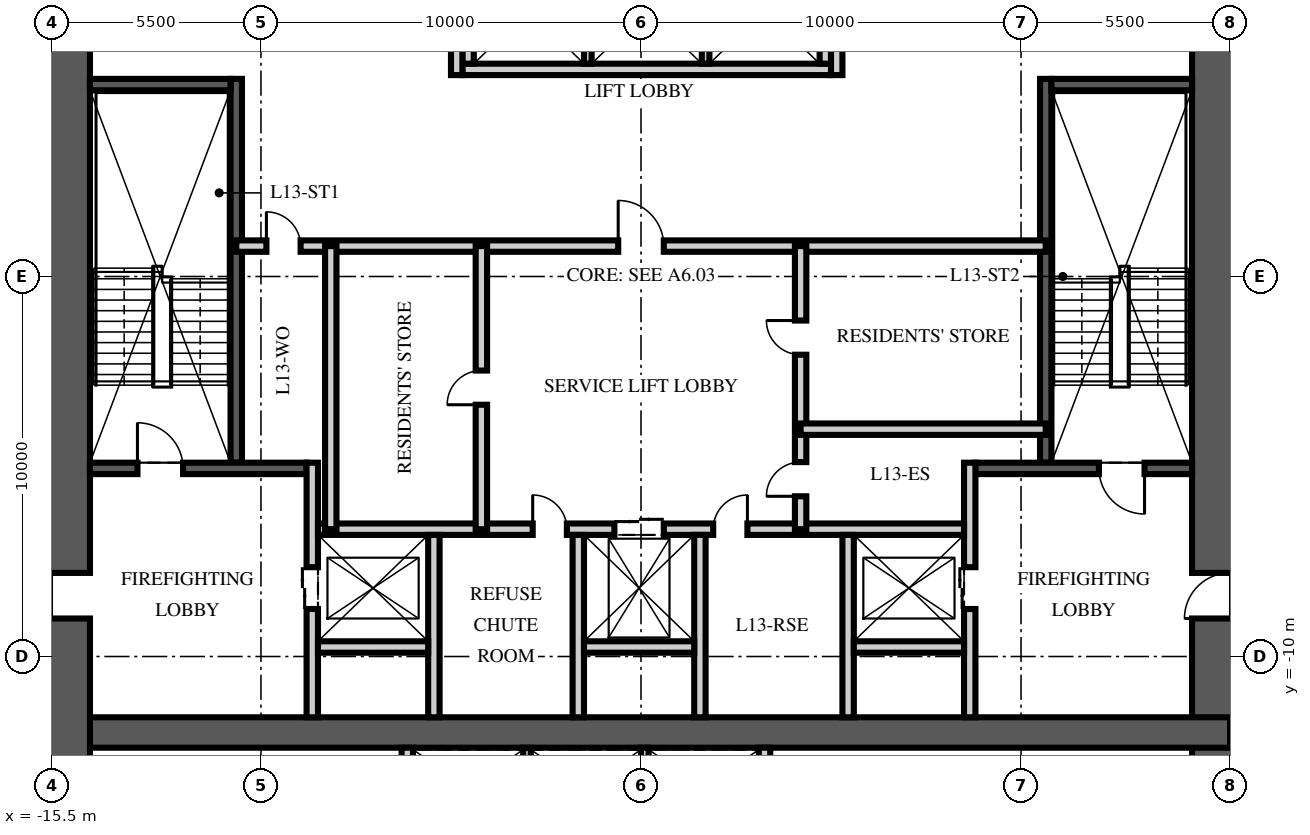
"""IFC4 building model, lengths in metres.
Left out: names, types, materials, properties, quantities, classifications, styles, units other than length and angle.
Written with IfcOpenShell. Run it as: python <this file> out.ifc"""

import sys

from ifc_helpers import new_model, si_unit, direction, frame, frame_2d, origin, place, context, subcontext, project, spatial, rectangle, extrude, element, fill, save


model = new_model("IFC4")
c1 = context("Model", 3, precision=1e-05, world=origin(), true_north=direction((0.0, 1.0)))
c2 = subcontext(c1, "Body", "Model", "MODEL_VIEW")
j1 = project(units=[si_unit("LENGTHUNIT", "METRE"), si_unit("PLANEANGLEUNIT", "RADIAN")], contexts=[c1])
p1 = place(None, origin())
s1 = spatial("IfcSite", under=j1, at=p1, CompositionType="ELEMENT")
p2 = place(p1, origin())
s2 = spatial("IfcBuilding", under=s1, at=p2, CompositionType="ELEMENT")
p3 = place(p2, frame((0.0, 0.0, 54.75)))
s3 = spatial("IfcBuildingStorey", under=s2, at=p3, CompositionType="ELEMENT", Elevation=54.75)
p4 = place(p3, frame((15.5, -15.5, -0.25), z_axis=(0.0, 0.0, 1.0), x_axis=(0.0, 1.0, 0.0)))
e1 = element("IfcWall", 1, at=p4, inside=s3, PredefinedType="SHEAR", context=c2, shape_type="SweptSolid", body=[
    extrude(rectangle(XDim=31.0, YDim=2.0, at=frame_2d((15.5, 0.0))), origin(), (0.0, 0.0, 1.0), 3.75),
])
p5 = place(p4, frame((6.5, 0.0, 0.25)))
e2 = element("IfcOpeningElement", 2, at=p5, cuts=e1, PredefinedType="OPENING", context=c2, shape_type="SweptSolid", body=[
    extrude(rectangle(XDim=1.2, YDim=2.1, at=frame_2d((0.6, 1.05))), frame((0.0, 1.01, 0.0), z_axis=(0.0, -1.0, 0.0), x_axis=(1.0, 0.0, 0.0)), (0.0, 0.0, 1.0), 2.02),
])
p6 = place(p4, frame((23.0, 0.0, 0.25)))
e3 = element("IfcOpeningElement", 3, at=p6, cuts=e1, PredefinedType="OPENING", context=c2, shape_type="SweptSolid", body=[
    extrude(rectangle(XDim=1.8, YDim=2.1, at=frame_2d((0.9, 1.05))), frame((0.0, 1.01, 0.0), z_axis=(0.0, -1.0, 0.0), x_axis=(1.0, 0.0, 0.0)), (0.0, 0.0, 1.0), 2.02),
])
p7 = place(p3, frame((-15.5, -12.0, -0.25), z_axis=(0.0, 0.0, 1.0), x_axis=(1.0, 0.0, 0.0)))
e4 = element("IfcWall", 4, at=p7, inside=s3, PredefinedType="SHEAR", context=c2, shape_type="SweptSolid", body=[
    extrude(rectangle(XDim=31.0, YDim=0.8, at=frame_2d((15.5, 0.0))), origin(), (0.0, 0.0, 1.0), 3.75),
])
p8 = place(p3, frame((-15.5, -15.5, -0.25), z_axis=(0.0, 0.0, 1.0), x_axis=(0.0, 1.0, 0.0)))
e5 = element("IfcWall", 5, at=p8, inside=s3, PredefinedType="SHEAR", context=c2, shape_type="SweptSolid", body=[
    extrude(rectangle(XDim=31.0, YDim=2.0, at=frame_2d((15.5, 0.0))), origin(), (0.0, 0.0, 1.0), 3.75),
])
p9 = place(p8, frame((6.5, 0.0, 0.25)))
e6 = element("IfcOpeningElement", 6, at=p9, cuts=e5, PredefinedType="OPENING", context=c2, shape_type="SweptSolid", body=[
    extrude(rectangle(XDim=1.2, YDim=2.1, at=frame_2d((0.6, 1.05))), frame((0.0, 1.01, 0.0), z_axis=(0.0, -1.0, 0.0), x_axis=(1.0, 0.0, 0.0)), (0.0, 0.0, 1.0), 2.02),
])
p10 = place(p8, frame((23.0, 0.0, 0.25)))
e7 = element("IfcOpeningElement", 7, at=p10, cuts=e5, PredefinedType="OPENING", context=c2, shape_type="SweptSolid", body=[
    extrude(rectangle(XDim=1.8, YDim=2.1, at=frame_2d((0.9, 1.05))), frame((0.0, 1.01, 0.0), z_axis=(0.0, -1.0, 0.0), x_axis=(1.0, 0.0, 0.0)), (0.0, 0.0, 1.0), 2.02),
])
p11 = place(p3, frame((-10.65, -4.9, 0.0), z_axis=(0.0, 0.0, 1.0), x_axis=(0.0, 1.0, 0.0)))
e8 = element("IfcWall", 8, at=p11, inside=s3, PredefinedType="SOLIDWALL", context=c2, shape_type="SweptSolid", body=[
    extrude(rectangle(XDim=10.1, YDim=0.3, at=frame_2d((5.05, 0.0))), origin(), (0.0, 0.0, 1.0), 3.5),
])
p12 = place(p3, frame((-14.5, -5.05, 0.0), z_axis=(0.0, 0.0, 1.0), x_axis=(1.0, 0.0, 0.0)))
e9 = element("IfcWall", 9, at=p12, inside=s3, PredefinedType="SOLIDWALL", context=c2, shape_type="SweptSolid", body=[
    extrude(rectangle(XDim=5.7, YDim=0.3, at=frame_2d((2.85, 0.0))), origin(), (0.0, 0.0, 1.0), 3.5),
])
p13 = place(p12, frame((1.25, 0.0, 0.0)))
e10 = element("IfcOpeningElement", 10, at=p13, cuts=e9, PredefinedType="OPENING", context=c2, shape_type="SweptSolid", body=[
    extrude(rectangle(XDim=1.2, YDim=2.1, at=frame_2d((0.6, 1.05))), frame((0.0, 0.16, 0.0), z_axis=(0.0, -1.0, 0.0), x_axis=(1.0, 0.0, 0.0)), (0.0, 0.0, 1.0), 0.32),
])
p14 = place(p3, frame((-14.5, 5.05, 0.0), z_axis=(0.0, 0.0, 1.0), x_axis=(1.0, 0.0, 0.0)))
e11 = element("IfcWall", 11, at=p14, inside=s3, PredefinedType="SOLIDWALL", context=c2, shape_type="SweptSolid", body=[
    extrude(rectangle(XDim=3.7, YDim=0.3, at=frame_2d((1.85, 0.0))), origin(), (0.0, 0.0, 1.0), 3.5),
])
p15 = place(p3, frame((-8.65, -11.6, 0.0), z_axis=(0.0, 0.0, 1.0), x_axis=(0.0, 1.0, 0.0)))
e12 = element("IfcWall", 12, at=p15, inside=s3, PredefinedType="PARTITIONING", context=c2, shape_type="SweptSolid", body=[
    extrude(rectangle(XDim=6.7, YDim=0.3, at=frame_2d((3.35, 0.0))), origin(), (0.0, 0.0, 1.0), 3.5),
])
p16 = place(p15, frame((2.85, 0.0, 0.0)))
e13 = element("IfcOpeningElement", 13, at=p16, cuts=e12, PredefinedType="OPENING", context=c2, shape_type="SweptSolid", body=[
    extrude(rectangle(XDim=1.1, YDim=2.1, at=frame_2d((0.55, 1.05))), frame((0.0, 0.16, 0.0), z_axis=(0.0, -1.0, 0.0), x_axis=(1.0, 0.0, 0.0)), (0.0, 0.0, 1.0), 0.32),
])
p17 = place(p3, frame((10.65, -4.9, 0.0), z_axis=(0.0, 0.0, 1.0), x_axis=(0.0, 1.0, 0.0)))
e14 = element("IfcWall", 14, at=p17, inside=s3, PredefinedType="SOLIDWALL", context=c2, shape_type="SweptSolid", body=[
    extrude(rectangle(XDim=10.1, YDim=0.3, at=frame_2d((5.05, 0.0))), origin(), (0.0, 0.0, 1.0), 3.5),
])
p18 = place(p3, frame((14.5, -5.05, 0.0), z_axis=(0.0, 0.0, 1.0), x_axis=(-1.0, 0.0, 0.0)))
e15 = element("IfcWall", 15, at=p18, inside=s3, PredefinedType="SOLIDWALL", context=c2, shape_type="SweptSolid", body=[
    extrude(rectangle(XDim=5.7, YDim=0.3, at=frame_2d((2.85, 0.0))), origin(), (0.0, 0.0, 1.0), 3.5),
])
p19 = place(p18, frame((1.25, 0.0, 0.0)))
e16 = element("IfcOpeningElement", 16, at=p19, cuts=e15, PredefinedType="OPENING", context=c2, shape_type="SweptSolid", body=[
    extrude(rectangle(XDim=1.2, YDim=2.1, at=frame_2d((0.6, 1.05))), frame((0.0, 0.16, 0.0), z_axis=(0.0, -1.0, 0.0), x_axis=(1.0, 0.0, 0.0)), (0.0, 0.0, 1.0), 0.32),
])
p20 = place(p3, frame((14.5, 5.05, 0.0), z_axis=(0.0, 0.0, 1.0), x_axis=(-1.0, 0.0, 0.0)))
e17 = element("IfcWall", 17, at=p20, inside=s3, PredefinedType="SOLIDWALL", context=c2, shape_type="SweptSolid", body=[
    extrude(rectangle(XDim=3.7, YDim=0.3, at=frame_2d((1.85, 0.0))), origin(), (0.0, 0.0, 1.0), 3.5),
])
p21 = place(p3, frame((8.65, -11.6, 0.0), z_axis=(0.0, 0.0, 1.0), x_axis=(0.0, 1.0, 0.0)))
e18 = element("IfcWall", 18, at=p21, inside=s3, PredefinedType="PARTITIONING", context=c2, shape_type="SweptSolid", body=[
    extrude(rectangle(XDim=6.7, YDim=0.3, at=frame_2d((3.35, 0.0))), origin(), (0.0, 0.0, 1.0), 3.5),
])
p22 = place(p21, frame((2.85, 0.0, 0.0)))
e19 = element("IfcOpeningElement", 19, at=p22, cuts=e18, PredefinedType="OPENING", context=c2, shape_type="SweptSolid", body=[
    extrude(rectangle(XDim=1.1, YDim=2.1, at=frame_2d((0.55, 1.05))), frame((0.0, 0.16, 0.0), z_axis=(0.0, -1.0, 0.0), x_axis=(1.0, 0.0, 0.0)), (0.0, 0.0, 1.0), 0.32),
])
p23 = place(p3, frame((-8.5, -6.65, 0.0), z_axis=(0.0, 0.0, 1.0), x_axis=(1.0, 0.0, 0.0)))
e20 = element("IfcWall", 20, at=p23, inside=s3, PredefinedType="PARTITIONING", context=c2, shape_type="SweptSolid", body=[
    extrude(rectangle(XDim=17.0, YDim=0.3, at=frame_2d((8.5, 0.0))), origin(), (0.0, 0.0, 1.0), 3.5),
])
p24 = place(p23, frame((7.8, 0.0, 0.0)))
e21 = element("IfcOpeningElement", 21, at=p24, cuts=e20, PredefinedType="OPENING", context=c2, shape_type="SweptSolid", body=[
    extrude(rectangle(XDim=1.3, YDim=2.4, at=frame_2d((0.65, 1.2))), frame((0.0, 0.16, 0.0), z_axis=(0.0, -1.0, 0.0), x_axis=(1.0, 0.0, 0.0)), (0.0, 0.0, 1.0), 0.32),
])
p25 = place(p23, frame((5.65, 0.0, 0.0)))
e22 = element("IfcOpeningElement", 22, at=p25, cuts=e20, PredefinedType="OPENING", context=c2, shape_type="SweptSolid", body=[
    extrude(rectangle(XDim=0.9, YDim=2.1, at=frame_2d((0.45, 1.05))), frame((0.0, 0.16, 0.0), z_axis=(0.0, -1.0, 0.0), x_axis=(1.0, 0.0, 0.0)), (0.0, 0.0, 1.0), 0.32),
])
p26 = place(p23, frame((10.4, 0.0, 0.0)))
e23 = element("IfcOpeningElement", 23, at=p26, cuts=e20, PredefinedType="OPENING", context=c2, shape_type="SweptSolid", body=[
    extrude(rectangle(XDim=0.9, YDim=2.1, at=frame_2d((0.45, 1.05))), frame((0.0, 0.16, 0.0), z_axis=(0.0, -1.0, 0.0), x_axis=(1.0, 0.0, 0.0)), (0.0, 0.0, 1.0), 0.32),
])
for number, where, z_axis, x_axis in (
    (24, (-5.45, -11.6, 0.0), (0.0, 0.0, 1.0), (0.0, 1.0, 0.0)),
    (25, (-1.65, -11.6, 0.0), (0.0, 0.0, 1.0), (0.0, 1.0, 0.0)),
    (26, (1.55, -11.6, 0.0), (0.0, 0.0, 1.0), (0.0, 1.0, 0.0)),
    (27, (5.45, -11.6, 0.0), (0.0, 0.0, 1.0), (0.0, 1.0, 0.0)),
):
    element("IfcWall", number, at=place(p3, frame(where, z_axis=z_axis, x_axis=x_axis)), inside=s3, PredefinedType="PARTITIONING", context=c2, shape_type="SweptSolid", body=[
        extrude(rectangle(XDim=4.8, YDim=0.3, at=frame_2d((2.4, 0.0))), origin(), (0.0, 0.0, 1.0), 3.5),
    ])
for number, where, z_axis, x_axis in (
    (28, (-8.5, -9.75, 0.0), (0.0, 0.0, 1.0), (1.0, 0.0, 0.0)),
    (29, (-1.5, -9.75, 0.0), (0.0, 0.0, 1.0), (1.0, 0.0, 0.0)),
    (30, (5.6, -9.75, 0.0), (0.0, 0.0, 1.0), (1.0, 0.0, 0.0)),
):
    element("IfcWall", number, at=place(p3, frame(where, z_axis=z_axis, x_axis=x_axis)), inside=s3, PredefinedType="PARTITIONING", context=c2, shape_type="SweptSolid", body=[
        extrude(rectangle(XDim=2.9, YDim=0.3, at=frame_2d((1.45, 0.0))), origin(), (0.0, 0.0, 1.0), 3.5),
    ])
p27 = place(p3, frame((-4.7, 5.45, 0.0), z_axis=(0.0, 0.0, 1.0), x_axis=(1.0, 0.0, 0.0)))
e31 = element("IfcWall", 31, at=p27, inside=s3, PredefinedType="PARTITIONING", context=c2, shape_type="SweptSolid", body=[
    extrude(rectangle(XDim=9.7, YDim=0.3, at=frame_2d((4.85, 0.0))), origin(), (0.0, 0.0, 1.0), 3.5),
])
for number, where, z_axis, x_axis in (
    (32, (-4.55, 5.6, 0.0), (0.0, 0.0, 1.0), (0.0, 1.0, 0.0)),
    (33, (4.85, 5.6, 0.0), (0.0, 0.0, 1.0), (0.0, 1.0, 0.0)),
):
    element("IfcWall", number, at=place(p3, frame(where, z_axis=z_axis, x_axis=x_axis)), inside=s3, PredefinedType="PARTITIONING", context=c2, shape_type="SweptSolid", body=[
        extrude(rectangle(XDim=2.8, YDim=0.3, at=frame_2d((1.4, 0.0))), origin(), (0.0, 0.0, 1.0), 3.5),
    ])
for number, where, z_axis, x_axis in (
    (34, (-1.4, 5.6, 0.0), (0.0, 0.0, 1.0), (0.0, 1.0, 0.0)),
    (35, (1.7, 5.6, 0.0), (0.0, 0.0, 1.0), (0.0, 1.0, 0.0)),
):
    element("IfcWall", number, at=place(p3, frame(where, z_axis=z_axis, x_axis=x_axis)), inside=s3, PredefinedType="PARTITIONING", context=c2, shape_type="SweptSolid", body=[
        extrude(rectangle(XDim=2.8, YDim=0.2, at=frame_2d((1.4, 0.0))), origin(), (0.0, 0.0, 1.0), 3.5),
    ])
for number, where, z_axis, x_axis in (
    (36, (-6.15, -14.5, 0.0), (0.0, 0.0, 1.0), (0.0, 1.0, 0.0)),
    (37, (3.25, -14.5, 0.0), (0.0, 0.0, 1.0), (0.0, 1.0, 0.0)),
):
    element("IfcWall", number, at=place(p3, frame(where, z_axis=z_axis, x_axis=x_axis)), inside=s3, PredefinedType="PARTITIONING", context=c2, shape_type="SweptSolid", body=[
        extrude(rectangle(XDim=2.1, YDim=0.3, at=frame_2d((1.05, 0.0))), origin(), (0.0, 0.0, 1.0), 3.5),
    ])
for number, where, z_axis, x_axis in (
    (38, (-3.0, -14.5, 0.0), (0.0, 0.0, 1.0), (0.0, 1.0, 0.0)),
    (39, (0.1, -14.5, 0.0), (0.0, 0.0, 1.0), (0.0, 1.0, 0.0)),
):
    element("IfcWall", number, at=place(p3, frame(where, z_axis=z_axis, x_axis=x_axis)), inside=s3, PredefinedType="PARTITIONING", context=c2, shape_type="SweptSolid", body=[
        extrude(rectangle(XDim=2.1, YDim=0.2, at=frame_2d((1.05, 0.0))), origin(), (0.0, 0.0, 1.0), 3.5),
    ])
p28 = place(p3, frame((-10.65, 0.8, 0.0), z_axis=(0.0, 0.0, 1.0), x_axis=(1.0, 0.0, 0.0)))
e40 = element("IfcWall", 40, at=p28, inside=s3, PredefinedType="PARTITIONING", context=c2, shape_type="SweptSolid", body=[
    extrude(rectangle(XDim=21.3, YDim=0.3, at=frame_2d((10.65, 0.0))), origin(), (0.0, 0.0, 1.0), 3.5),
])
p29 = place(p28, frame((10.05, 0.0, 0.0)))
e41 = element("IfcOpeningElement", 41, at=p29, cuts=e40, PredefinedType="OPENING", context=c2, shape_type="SweptSolid", body=[
    extrude(rectangle(XDim=1.2, YDim=2.1, at=frame_2d((0.6, 1.05))), frame((0.0, 0.16, 0.0), z_axis=(0.0, -1.0, 0.0), x_axis=(1.0, 0.0, 0.0)), (0.0, 0.0, 1.0), 0.32),
])
p30 = place(p28, frame((0.793, 0.0, 0.0)))
e42 = element("IfcOpeningElement", 42, at=p30, cuts=e40, PredefinedType="OPENING", context=c2, shape_type="SweptSolid", body=[
    extrude(rectangle(XDim=0.9, YDim=2.1, at=frame_2d((0.45, 1.05))), frame((0.0, 0.16, 0.0), z_axis=(0.0, -1.0, 0.0), x_axis=(1.0, 0.0, 0.0)), (0.0, 0.0, 1.0), 0.32),
])
p31 = place(p3, frame((-4.2, -6.65, 0.0), z_axis=(0.0, 0.0, 1.0), x_axis=(0.0, 1.0, 0.0)))
e43 = element("IfcWall", 43, at=p31, inside=s3, PredefinedType="PARTITIONING", context=c2, shape_type="SweptSolid", body=[
    extrude(rectangle(XDim=7.45, YDim=0.3, at=frame_2d((3.725, 0.0))), origin(), (0.0, 0.0, 1.0), 3.5),
])
p32 = place(p31, frame((3.275, 0.0, 0.0)))
e44 = element("IfcOpeningElement", 44, at=p32, cuts=e43, PredefinedType="OPENING", context=c2, shape_type="SweptSolid", body=[
    extrude(rectangle(XDim=0.9, YDim=2.1, at=frame_2d((0.45, 1.05))), frame((0.0, 0.16, 0.0), z_axis=(0.0, -1.0, 0.0), x_axis=(1.0, 0.0, 0.0)), (0.0, 0.0, 1.0), 0.32),
])
p33 = place(p3, frame((4.2, -6.65, 0.0), z_axis=(0.0, 0.0, 1.0), x_axis=(0.0, 1.0, 0.0)))
e45 = element("IfcWall", 45, at=p33, inside=s3, PredefinedType="PARTITIONING", context=c2, shape_type="SweptSolid", body=[
    extrude(rectangle(XDim=7.45, YDim=0.3, at=frame_2d((3.725, 0.0))), origin(), (0.0, 0.0, 1.0), 3.5),
])
p34 = place(p33, frame((0.866, 0.0, 0.0)))
e46 = element("IfcOpeningElement", 46, at=p34, cuts=e45, PredefinedType="OPENING", context=c2, shape_type="SweptSolid", body=[
    extrude(rectangle(XDim=0.9, YDim=2.1, at=frame_2d((0.45, 1.05))), frame((0.0, 0.16, 0.0), z_axis=(0.0, -1.0, 0.0), x_axis=(1.0, 0.0, 0.0)), (0.0, 0.0, 1.0), 0.32),
])
p35 = place(p33, frame((4.591, 0.0, 0.0)))
e47 = element("IfcOpeningElement", 47, at=p35, cuts=e45, PredefinedType="OPENING", context=c2, shape_type="SweptSolid", body=[
    extrude(rectangle(XDim=0.9, YDim=2.1, at=frame_2d((0.45, 1.05))), frame((0.0, 0.16, 0.0), z_axis=(0.0, -1.0, 0.0), x_axis=(1.0, 0.0, 0.0)), (0.0, 0.0, 1.0), 0.32),
])
p36 = place(p3, frame((-8.163, -6.65, 0.0), z_axis=(0.0, 0.0, 1.0), x_axis=(0.0, 1.0, 0.0)))
e48 = element("IfcWall", 48, at=p36, inside=s3, PredefinedType="PARTITIONING", context=c2, shape_type="SweptSolid", body=[
    extrude(rectangle(XDim=7.45, YDim=0.3, at=frame_2d((3.725, 0.0))), origin(), (0.0, 0.0, 1.0), 3.5),
])
p37 = place(p3, frame((10.65, -4.018, 0.0), z_axis=(0.0, 0.0, 1.0), x_axis=(-1.0, 0.0, 0.0)))
e49 = element("IfcWall", 49, at=p37, inside=s3, PredefinedType="PARTITIONING", context=c2, shape_type="SweptSolid", body=[
    extrude(rectangle(XDim=6.45, YDim=0.3, at=frame_2d((3.225, 0.0))), origin(), (0.0, 0.0, 1.0), 3.5),
])
p38 = place(p3, frame((-4.85, 5.3, 0.0), z_axis=(0.0, 0.0, 1.0), x_axis=(0.0, 1.0, 0.0)))
e50 = element("IfcWall", 50, at=p38, inside=s3, PredefinedType="PARTITIONING", context=c2, shape_type="SweptSolid", body=[
    extrude(rectangle(XDim=6.3, YDim=0.3, at=frame_2d((3.15, 0.0))), origin(), (0.0, 0.0, 1.0), 3.5),
])
p39 = place(p38, frame((4.35, 0.0, 0.0)))
e51 = element("IfcOpeningElement", 51, at=p39, cuts=e50, PredefinedType="OPENING", context=c2, shape_type="SweptSolid", body=[
    extrude(rectangle(XDim=0.9, YDim=2.1, at=frame_2d((0.45, 1.05))), frame((0.0, 0.16, 0.0), z_axis=(0.0, -1.0, 0.0), x_axis=(1.0, 0.0, 0.0)), (0.0, 0.0, 1.0), 0.32),
])
p40 = place(p3, frame((5.15, 5.3, 0.0), z_axis=(0.0, 0.0, 1.0), x_axis=(0.0, 1.0, 0.0)))
e52 = element("IfcWall", 52, at=p40, inside=s3, PredefinedType="PARTITIONING", context=c2, shape_type="SweptSolid", body=[
    extrude(rectangle(XDim=6.3, YDim=0.3, at=frame_2d((3.15, 0.0))), origin(), (0.0, 0.0, 1.0), 3.5),
])
p41 = place(p40, frame((4.35, 0.0, 0.0)))
e53 = element("IfcOpeningElement", 53, at=p41, cuts=e52, PredefinedType="OPENING", context=c2, shape_type="SweptSolid", body=[
    extrude(rectangle(XDim=0.9, YDim=2.1, at=frame_2d((0.45, 1.05))), frame((0.0, 0.16, 0.0), z_axis=(0.0, -1.0, 0.0), x_axis=(1.0, 0.0, 0.0)), (0.0, 0.0, 1.0), 0.32),
])
p42 = place(p13, origin())
e54 = element("IfcDoor", 54, at=p42, inside=s3, OperationType="SINGLE_SWING_LEFT", PredefinedType="DOOR", context=c2, shape_type="SweptSolid", body=[
    extrude(rectangle(XDim=1.2, YDim=2.1, at=frame_2d((0.6, 1.05))), frame((0.0, 0.025, 0.0), z_axis=(0.0, -1.0, 0.0), x_axis=(1.0, 0.0, 0.0)), (0.0, 0.0, 1.0), 0.05),
])
fill(e10, e54)
p43 = place(p9, origin())
e55 = element("IfcDoor", 55, at=p43, inside=s3, OperationType="SINGLE_SWING_LEFT", PredefinedType="DOOR", context=c2, shape_type="SweptSolid", body=[
    extrude(rectangle(XDim=1.2, YDim=2.1, at=frame_2d((0.6, 1.05))), frame((0.0, 0.025, 0.0), z_axis=(0.0, -1.0, 0.0), x_axis=(1.0, 0.0, 0.0)), (0.0, 0.0, 1.0), 0.05),
])
fill(e6, e55)
p44 = place(p19, origin())
e56 = element("IfcDoor", 56, at=p44, inside=s3, OperationType="SINGLE_SWING_LEFT", PredefinedType="DOOR", context=c2, shape_type="SweptSolid", body=[
    extrude(rectangle(XDim=1.2, YDim=2.1, at=frame_2d((0.6, 1.05))), frame((0.0, 0.025, 0.0), z_axis=(0.0, -1.0, 0.0), x_axis=(1.0, 0.0, 0.0)), (0.0, 0.0, 1.0), 0.05),
])
fill(e16, e56)
p45 = place(p5, origin())
e57 = element("IfcDoor", 57, at=p45, inside=s3, OperationType="SINGLE_SWING_LEFT", PredefinedType="DOOR", context=c2, shape_type="SweptSolid", body=[
    extrude(rectangle(XDim=1.2, YDim=2.1, at=frame_2d((0.6, 1.05))), frame((0.0, 0.025, 0.0), z_axis=(0.0, -1.0, 0.0), x_axis=(1.0, 0.0, 0.0)), (0.0, 0.0, 1.0), 0.05),
])
fill(e2, e57)
p46 = place(p16, origin())
e58 = element("IfcDoor", 58, at=p46, inside=s3, OperationType="DOUBLE_DOOR_SLIDING", PredefinedType="DOOR", context=c2, shape_type="SweptSolid", body=[
    extrude(rectangle(XDim=1.1, YDim=2.1, at=frame_2d((0.55, 1.05))), frame((0.0, 0.025, 0.0), z_axis=(0.0, -1.0, 0.0), x_axis=(1.0, 0.0, 0.0)), (0.0, 0.0, 1.0), 0.05),
])
fill(e13, e58)
p47 = place(p22, origin())
e59 = element("IfcDoor", 59, at=p47, inside=s3, OperationType="DOUBLE_DOOR_SLIDING", PredefinedType="DOOR", context=c2, shape_type="SweptSolid", body=[
    extrude(rectangle(XDim=1.1, YDim=2.1, at=frame_2d((0.55, 1.05))), frame((0.0, 0.025, 0.0), z_axis=(0.0, -1.0, 0.0), x_axis=(1.0, 0.0, 0.0)), (0.0, 0.0, 1.0), 0.05),
])
fill(e19, e59)
p48 = place(p24, origin())
e60 = element("IfcDoor", 60, at=p48, inside=s3, OperationType="DOUBLE_DOOR_SLIDING", PredefinedType="DOOR", context=c2, shape_type="SweptSolid", body=[
    extrude(rectangle(XDim=1.3, YDim=2.4, at=frame_2d((0.65, 1.2))), frame((0.0, 0.025, 0.0), z_axis=(0.0, -1.0, 0.0), x_axis=(1.0, 0.0, 0.0)), (0.0, 0.0, 1.0), 0.05),
])
fill(e21, e60)
p49 = place(p29, origin())
e61 = element("IfcDoor", 61, at=p49, inside=s3, OperationType="SINGLE_SWING_LEFT", PredefinedType="DOOR", context=c2, shape_type="SweptSolid", body=[
    extrude(rectangle(XDim=1.2, YDim=2.1, at=frame_2d((0.6, 1.05))), frame((0.0, 0.025, 0.0), z_axis=(0.0, -1.0, 0.0), x_axis=(1.0, 0.0, 0.0)), (0.0, 0.0, 1.0), 0.05),
])
fill(e41, e61)
p50 = place(p25, origin())
e62 = element("IfcDoor", 62, at=p50, inside=s3, OperationType="SINGLE_SWING_LEFT", PredefinedType="DOOR", context=c2, shape_type="SweptSolid", body=[
    extrude(rectangle(XDim=0.9, YDim=2.1, at=frame_2d((0.45, 1.05))), frame((0.0, 0.025, 0.0), z_axis=(0.0, -1.0, 0.0), x_axis=(1.0, 0.0, 0.0)), (0.0, 0.0, 1.0), 0.05),
])
fill(e22, e62)
p51 = place(p26, origin())
e63 = element("IfcDoor", 63, at=p51, inside=s3, OperationType="SINGLE_SWING_RIGHT", PredefinedType="DOOR", context=c2, shape_type="SweptSolid", body=[
    extrude(rectangle(XDim=0.9, YDim=2.1, at=frame_2d((0.45, 1.05))), frame((0.0, 0.025, 0.0), z_axis=(0.0, -1.0, 0.0), x_axis=(1.0, 0.0, 0.0)), (0.0, 0.0, 1.0), 0.05),
])
fill(e23, e63)
p52 = place(p32, origin())
e64 = element("IfcDoor", 64, at=p52, inside=s3, OperationType="SINGLE_SWING_LEFT", PredefinedType="DOOR", context=c2, shape_type="SweptSolid", body=[
    extrude(rectangle(XDim=0.9, YDim=2.1, at=frame_2d((0.45, 1.05))), frame((0.0, 0.025, 0.0), z_axis=(0.0, -1.0, 0.0), x_axis=(1.0, 0.0, 0.0)), (0.0, 0.0, 1.0), 0.05),
])
fill(e44, e64)
p53 = place(p30, origin())
e65 = element("IfcDoor", 65, at=p53, inside=s3, OperationType="SINGLE_SWING_LEFT", PredefinedType="DOOR", context=c2, shape_type="SweptSolid", body=[
    extrude(rectangle(XDim=0.9, YDim=2.1, at=frame_2d((0.45, 1.05))), frame((0.0, 0.025, 0.0), z_axis=(0.0, -1.0, 0.0), x_axis=(1.0, 0.0, 0.0)), (0.0, 0.0, 1.0), 0.05),
])
fill(e42, e65)
p54 = place(p34, origin())
e66 = element("IfcDoor", 66, at=p54, inside=s3, OperationType="SINGLE_SWING_LEFT", PredefinedType="DOOR", context=c2, shape_type="SweptSolid", body=[
    extrude(rectangle(XDim=0.9, YDim=2.1, at=frame_2d((0.45, 1.05))), frame((0.0, 0.025, 0.0), z_axis=(0.0, -1.0, 0.0), x_axis=(1.0, 0.0, 0.0)), (0.0, 0.0, 1.0), 0.05),
])
fill(e46, e66)
p55 = place(p35, origin())
e67 = element("IfcDoor", 67, at=p55, inside=s3, OperationType="SINGLE_SWING_RIGHT", PredefinedType="DOOR", context=c2, shape_type="SweptSolid", body=[
    extrude(rectangle(XDim=0.9, YDim=2.1, at=frame_2d((0.45, 1.05))), frame((0.0, 0.025, 0.0), z_axis=(0.0, -1.0, 0.0), x_axis=(1.0, 0.0, 0.0)), (0.0, 0.0, 1.0), 0.05),
])
fill(e47, e67)
save(model, sys.argv[1])
